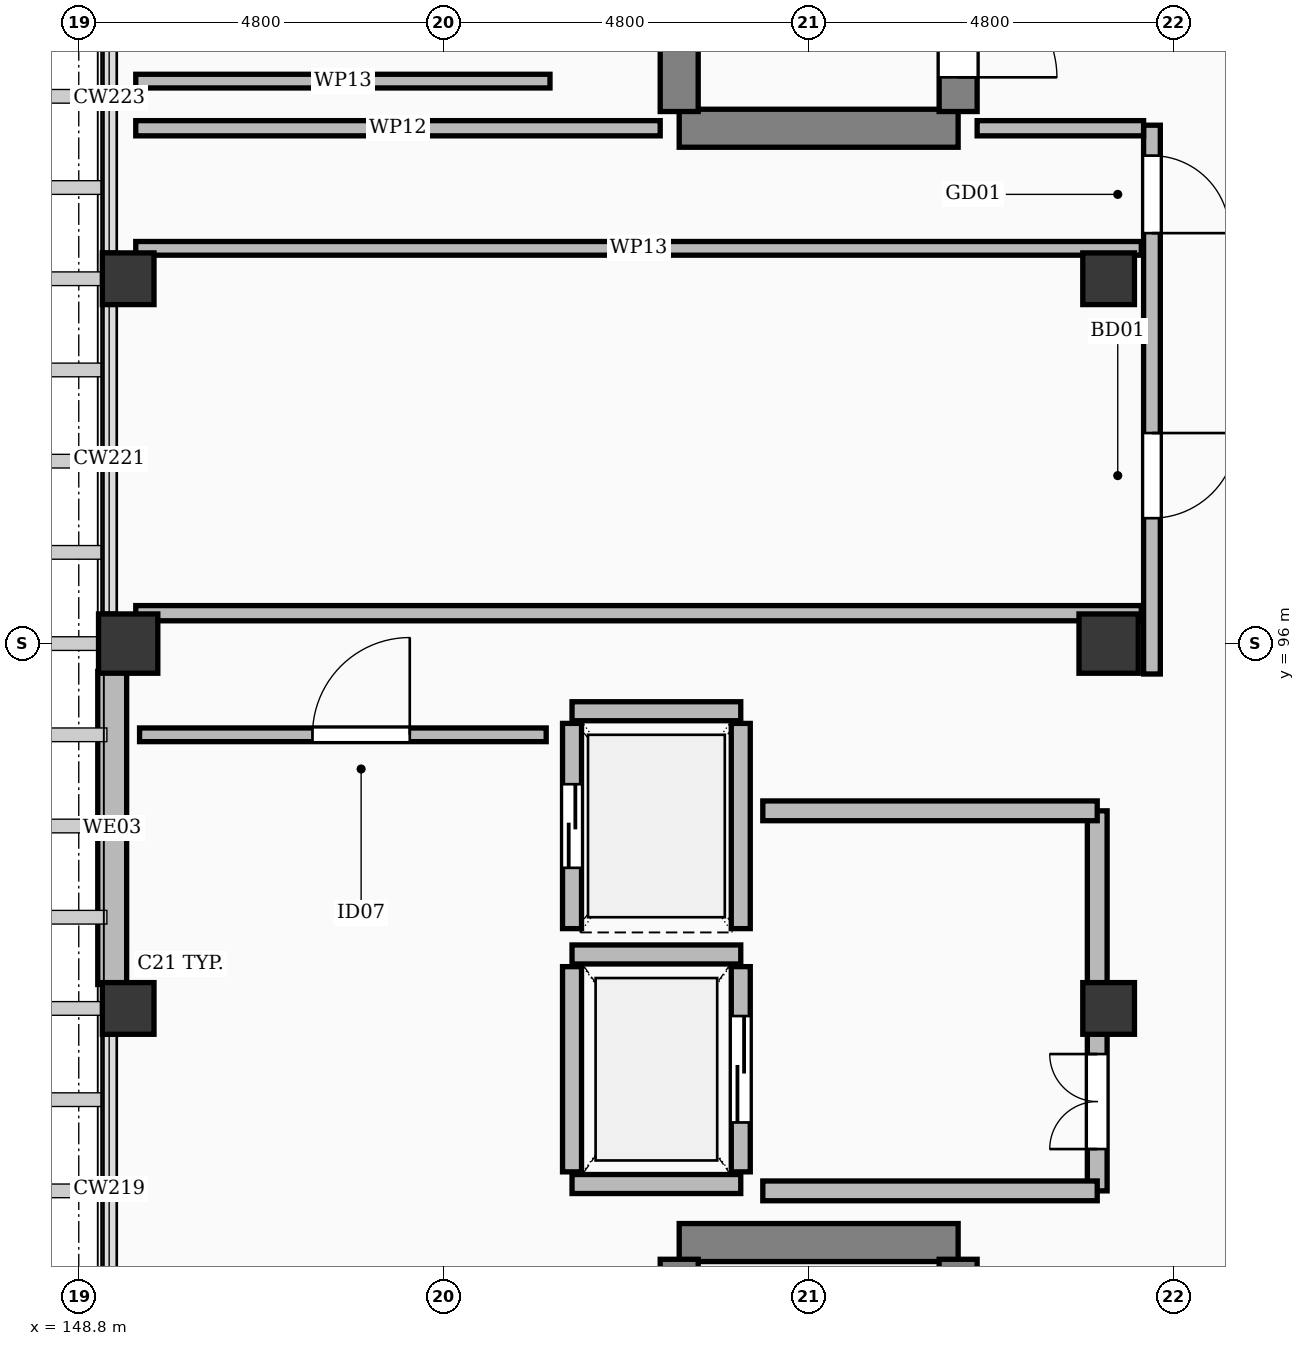
"""IFC4 building model, lengths in metres.
Left out: names, types, materials, properties, quantities, classifications, styles, units other than length and angle.
Written with IfcOpenShell. Run it as: python <this file> out.ifc"""

import sys

from ifc_helpers import new_model, si_unit, direction, frame, frame_2d, origin, origin_2d, place, context, subcontext, project, spatial, rectangle, extrude, element, fill, save


model = new_model("IFC4")
c1 = context("Model", 3, precision=1e-05, world=origin(), true_north=direction((0.0, 1.0)))
c2 = subcontext(c1, "Body", "Model", "MODEL_VIEW")
j1 = project(units=[si_unit("LENGTHUNIT", "METRE"), si_unit("PLANEANGLEUNIT", "RADIAN")], contexts=[c1])
p1 = place(None, origin())
s1 = spatial("IfcSite", under=j1, at=p1, CompositionType="ELEMENT")
p2 = place(p1, origin())
s2 = spatial("IfcBuilding", under=s1, at=p2, CompositionType="ELEMENT")
p3 = place(p2, frame((0.0, 0.0, 24.6)))
s3 = spatial("IfcBuildingStorey", under=s2, at=p3, CompositionType="ELEMENT", Elevation=24.6)
for number, where, z_axis, x_axis in (
    (1, (149.45, 96.0, 0.0), (0.0, 0.0, 1.0), (1.0, 0.0, 0.0)),
    (2, (162.35, 96.0, 0.0), (0.0, 0.0, 1.0), (1.0, 0.0, 0.0)),
):
    element("IfcColumn", number, at=place(p3, frame(where, z_axis=z_axis, x_axis=x_axis)), inside=s3, PredefinedType="COLUMN", context=c2, shape_type="SweptSolid", body=[
        extrude(rectangle(XDim=0.78, YDim=0.78, at=origin_2d()), origin(), (0.0, 0.0, 1.0), 3.6),
    ])
for number, where, z_axis, x_axis in (
    (3, (149.45, 91.2, 0.0), (0.0, 0.0, 1.0), (1.0, 0.0, 0.0)),
    (4, (149.45, 100.8, 0.0), (0.0, 0.0, 1.0), (1.0, 0.0, 0.0)),
    (5, (162.35, 91.2, 0.0), (0.0, 0.0, 1.0), (1.0, 0.0, 0.0)),
    (6, (162.35, 100.8, 0.0), (0.0, 0.0, 1.0), (1.0, 0.0, 0.0)),
):
    element("IfcColumn", number, at=place(p3, frame(where, z_axis=z_axis, x_axis=x_axis)), inside=s3, PredefinedType="COLUMN", context=c2, shape_type="SweptSolid", body=[
        extrude(rectangle(XDim=0.68, YDim=0.68, at=origin_2d()), origin(), (0.0, 0.0, 1.0), 3.6),
    ])
p4 = place(p3, frame((149.24, 91.515, 0.0), z_axis=(0.0, 0.0, 1.0), x_axis=(0.0, 1.0, 0.0)))
e7 = element("IfcWall", 7, at=p4, inside=s3, PredefinedType="SOLIDWALL", context=c2, shape_type="SweptSolid", body=[
    extrude(rectangle(XDim=4.12, YDim=0.38, at=frame_2d((2.06, 0.0))), origin(), (0.0, 0.0, 1.0), 2.632),
])
p5 = place(p3, frame((156.7, 88.12, 0.0), z_axis=(0.0, 0.0, 1.0), x_axis=(1.0, 0.0, 0.0)))
e8 = element("IfcWall", 8, at=p5, inside=s3, PredefinedType="SHEAR", context=c2, shape_type="SweptSolid", body=[
    extrude(rectangle(XDim=3.67, YDim=0.5, at=frame_2d((1.835, 0.0))), origin(), (0.0, 0.0, 1.0), 3.34),
])
p6 = place(p3, frame((156.7, 77.4, 0.0), z_axis=(0.0, 0.0, 1.0), x_axis=(0.0, 1.0, 0.0)))
e9 = element("IfcWall", 9, at=p6, inside=s3, PredefinedType="SHEAR", context=c2, shape_type="SweptSolid", body=[
    extrude(rectangle(XDim=10.5, YDim=0.5, at=frame_2d((5.25, 0.0))), origin(), (0.0, 0.0, 1.0), 3.34),
])
p7 = place(p3, frame((160.37, 77.4, 0.0), z_axis=(0.0, 0.0, 1.0), x_axis=(0.0, 1.0, 0.0)))
e10 = element("IfcWall", 10, at=p7, inside=s3, PredefinedType="SHEAR", context=c2, shape_type="SweptSolid", body=[
    extrude(rectangle(XDim=10.5, YDim=0.5, at=frame_2d((5.25, 0.0))), origin(), (0.0, 0.0, 1.0), 3.34),
])
p8 = place(p7, frame((0.45, 0.0, 0.0)))
e11 = element("IfcOpeningElement", 11, at=p8, cuts=e10, PredefinedType="OPENING", context=c2, shape_type="SweptSolid", body=[
    extrude(rectangle(XDim=1.3, YDim=2.15, at=frame_2d((0.65, 1.075))), frame((0.0, 0.262, 0.0), z_axis=(0.0, -1.0, 0.0), x_axis=(1.0, 0.0, 0.0)), (0.0, 0.0, 1.0), 0.524),
])
for number, where, z_axis, x_axis in (
    (12, (155.29, 88.89, 0.0), (0.0, 0.0, 1.0), (1.0, 0.0, 0.0)),
    (13, (155.29, 91.91, 0.0), (0.0, 0.0, 1.0), (1.0, 0.0, 0.0)),
):
    element("IfcWall", number, at=place(p3, frame(where, z_axis=z_axis, x_axis=x_axis)), inside=s3, PredefinedType="SOLIDWALL", context=c2, shape_type="SweptSolid", body=[
        extrude(rectangle(XDim=2.22, YDim=0.25, at=frame_2d((1.11, 0.0))), origin(), (0.0, 0.0, 1.0), 3.34),
    ])
p9 = place(p3, frame((155.29, 89.05, 0.0), z_axis=(0.0, 0.0, 1.0), x_axis=(0.0, 1.0, 0.0)))
e14 = element("IfcWall", 14, at=p9, inside=s3, PredefinedType="SOLIDWALL", context=c2, shape_type="SweptSolid", body=[
    extrude(rectangle(XDim=2.7, YDim=0.25, at=frame_2d((1.35, 0.0))), origin(), (0.0, 0.0, 1.0), 2.632),
])
p10 = place(p3, frame((157.51, 89.05, 0.0), z_axis=(0.0, 0.0, 1.0), x_axis=(0.0, 1.0, 0.0)))
e15 = element("IfcWall", 15, at=p10, inside=s3, PredefinedType="SOLIDWALL", context=c2, shape_type="SweptSolid", body=[
    extrude(rectangle(XDim=2.7, YDim=0.25, at=frame_2d((1.35, 0.0))), origin(), (0.0, 0.0, 1.0), 2.632),
])
p11 = place(p10, frame((0.65, 0.0, 0.0)))
e16 = element("IfcOpeningElement", 16, at=p11, cuts=e15, PredefinedType="OPENING", context=c2, shape_type="SweptSolid", body=[
    extrude(rectangle(XDim=1.4, YDim=2.3, at=frame_2d((0.7, 1.15))), frame((0.0, 0.137, 0.0), z_axis=(0.0, -1.0, 0.0), x_axis=(1.0, 0.0, 0.0)), (0.0, 0.0, 1.0), 0.274),
])
p12 = place(p3, frame((155.29, 95.11, 0.0), z_axis=(0.0, 0.0, 1.0), x_axis=(1.0, 0.0, 0.0)))
e17 = element("IfcWall", 17, at=p12, inside=s3, PredefinedType="SOLIDWALL", context=c2, shape_type="SweptSolid", body=[
    extrude(rectangle(XDim=2.22, YDim=0.25, at=frame_2d((1.11, 0.0))), origin(), (0.0, 0.0, 1.0), 3.34),
])
p13 = place(p3, frame((155.29, 92.25, 0.0), z_axis=(0.0, 0.0, 1.0), x_axis=(0.0, 1.0, 0.0)))
e18 = element("IfcWall", 18, at=p13, inside=s3, PredefinedType="SOLIDWALL", context=c2, shape_type="SweptSolid", body=[
    extrude(rectangle(XDim=2.7, YDim=0.25, at=frame_2d((1.35, 0.0))), origin(), (0.0, 0.0, 1.0), 3.34),
])
p14 = place(p13, frame((0.8, 0.0, 0.0)))
e19 = element("IfcOpeningElement", 19, at=p14, cuts=e18, PredefinedType="OPENING", context=c2, shape_type="SweptSolid", body=[
    extrude(rectangle(XDim=1.1, YDim=2.2, at=frame_2d((0.55, 1.1))), frame((0.0, 0.137, 0.0), z_axis=(0.0, -1.0, 0.0), x_axis=(1.0, 0.0, 0.0)), (0.0, 0.0, 1.0), 0.274),
])
p15 = place(p3, frame((157.51, 92.25, 0.0), z_axis=(0.0, 0.0, 1.0), x_axis=(0.0, 1.0, 0.0)))
e20 = element("IfcWall", 20, at=p15, inside=s3, PredefinedType="SOLIDWALL", context=c2, shape_type="SweptSolid", body=[
    extrude(rectangle(XDim=2.7, YDim=0.25, at=frame_2d((1.35, 0.0))), origin(), (0.0, 0.0, 1.0), 3.34),
])
p16 = place(p3, frame((162.2, 88.8, 0.0), z_axis=(0.0, 0.0, 1.0), x_axis=(0.0, 1.0, 0.0)))
e21 = element("IfcWall", 21, at=p16, inside=s3, PredefinedType="SOLIDWALL", context=c2, shape_type="SweptSolid", body=[
    extrude(rectangle(XDim=5.0, YDim=0.26, at=frame_2d((2.5, 0.0))), origin(), (0.0, 0.0, 1.0), 2.632),
])
p17 = place(p16, frame((0.55, 0.0, 0.0)))
e22 = element("IfcOpeningElement", 22, at=p17, cuts=e21, PredefinedType="OPENING", context=c2, shape_type="SweptSolid", body=[
    extrude(rectangle(XDim=1.25, YDim=2.15, at=frame_2d((0.625, 1.075))), frame((0.0, 0.142, 0.0), z_axis=(0.0, -1.0, 0.0), x_axis=(1.0, 0.0, 0.0)), (0.0, 0.0, 1.0), 0.284),
])
for number, where, z_axis, x_axis in (
    (23, (157.8, 88.8, 0.0), (0.0, 0.0, 1.0), (1.0, 0.0, 0.0)),
    (24, (157.8, 93.8, 0.0), (0.0, 0.0, 1.0), (1.0, 0.0, 0.0)),
):
    element("IfcWall", number, at=place(p3, frame(where, z_axis=z_axis, x_axis=x_axis)), inside=s3, PredefinedType="SOLIDWALL", context=c2, shape_type="SweptSolid", body=[
        extrude(rectangle(XDim=4.4, YDim=0.26, at=frame_2d((2.2, 0.0))), origin(), (0.0, 0.0, 1.0), 2.632),
    ])
p18 = place(p3, frame((156.7, 102.78, 0.0), z_axis=(0.0, 0.0, 1.0), x_axis=(1.0, 0.0, 0.0)))
e25 = element("IfcWall", 25, at=p18, inside=s3, PredefinedType="SHEAR", context=c2, shape_type="SweptSolid", body=[
    extrude(rectangle(XDim=3.67, YDim=0.5, at=frame_2d((1.835, 0.0))), origin(), (0.0, 0.0, 1.0), 3.34),
])
p19 = place(p3, frame((156.7, 103.0, 0.0), z_axis=(0.0, 0.0, 1.0), x_axis=(0.0, 1.0, 0.0)))
e26 = element("IfcWall", 26, at=p19, inside=s3, PredefinedType="SHEAR", context=c2, shape_type="SweptSolid", body=[
    extrude(rectangle(XDim=10.5, YDim=0.5, at=frame_2d((5.25, 0.0))), origin(), (0.0, 0.0, 1.0), 3.34),
])
p20 = place(p3, frame((160.37, 103.0, 0.0), z_axis=(0.0, 0.0, 1.0), x_axis=(0.0, 1.0, 0.0)))
e27 = element("IfcWall", 27, at=p20, inside=s3, PredefinedType="SHEAR", context=c2, shape_type="SweptSolid", body=[
    extrude(rectangle(XDim=10.5, YDim=0.5, at=frame_2d((5.25, 0.0))), origin(), (0.0, 0.0, 1.0), 3.34),
])
p21 = place(p20, frame((0.45, 0.0, 0.0)))
e28 = element("IfcOpeningElement", 28, at=p21, cuts=e27, PredefinedType="OPENING", context=c2, shape_type="SweptSolid", body=[
    extrude(rectangle(XDim=1.3, YDim=2.15, at=frame_2d((0.65, 1.075))), frame((0.0, 0.262, 0.0), z_axis=(0.0, -1.0, 0.0), x_axis=(1.0, 0.0, 0.0)), (0.0, 0.0, 1.0), 0.524),
])
p22 = place(p3, frame((162.92, 95.6, 0.0), z_axis=(0.0, 0.0, 1.0), x_axis=(0.0, 1.0, 0.0)))
e29 = element("IfcWall", 29, at=p22, inside=s3, PredefinedType="PARTITIONING", context=c2, shape_type="SweptSolid", body=[
    extrude(rectangle(XDim=7.22, YDim=0.22, at=frame_2d((3.61, 0.0))), origin(), (0.0, 0.0, 1.0), 2.632),
])
p23 = place(p22, frame((2.05, 0.0, 0.0)))
e30 = element("IfcOpeningElement", 30, at=p23, cuts=e29, PredefinedType="OPENING", context=c2, shape_type="SweptSolid", body=[
    extrude(rectangle(XDim=1.12, YDim=2.15, at=frame_2d((0.56, 1.075))), frame((0.0, 0.122, 0.0), z_axis=(0.0, -1.0, 0.0), x_axis=(1.0, 0.0, 0.0)), (0.0, 0.0, 1.0), 0.244),
])
p24 = place(p22, frame((5.8, 0.0, 0.0)))
e31 = element("IfcOpeningElement", 31, at=p24, cuts=e29, PredefinedType="OPENING", context=c2, shape_type="SweptSolid", body=[
    extrude(rectangle(XDim=1.02, YDim=2.2, at=frame_2d((0.51, 1.1))), frame((0.0, 0.122, 0.0), z_axis=(0.0, -1.0, 0.0), x_axis=(1.0, 0.0, 0.0)), (0.0, 0.0, 1.0), 0.244),
])
p25 = place(p3, frame((149.55, 96.4, 0.0), z_axis=(0.0, 0.0, 1.0), x_axis=(1.0, 0.0, 0.0)))
e32 = element("IfcWall", 32, at=p25, inside=s3, PredefinedType="PARTITIONING", context=c2, shape_type="SweptSolid", body=[
    extrude(rectangle(XDim=13.23, YDim=0.2, at=frame_2d((6.615, 0.0))), origin(), (0.0, 0.0, 1.0), 2.632),
])
p26 = place(p3, frame((149.55, 101.2, 0.0), z_axis=(0.0, 0.0, 1.0), x_axis=(1.0, 0.0, 0.0)))
e33 = element("IfcWall", 33, at=p26, inside=s3, PredefinedType="PARTITIONING", context=c2, shape_type="SweptSolid", body=[
    extrude(rectangle(XDim=13.23, YDim=0.18, at=frame_2d((6.615, 0.0))), origin(), (0.0, 0.0, 1.0), 2.632),
])
p27 = place(p3, frame((149.55, 102.78, 0.0), z_axis=(0.0, 0.0, 1.0), x_axis=(1.0, 0.0, 0.0)))
e34 = element("IfcWall", 34, at=p27, inside=s3, PredefinedType="PARTITIONING", context=c2, shape_type="SweptSolid", body=[
    extrude(rectangle(XDim=6.9, YDim=0.2, at=frame_2d((3.45, 0.0))), origin(), (0.0, 0.0, 1.0), 2.632),
])
p28 = place(p3, frame((160.62, 102.78, 0.0), z_axis=(0.0, 0.0, 1.0), x_axis=(1.0, 0.0, 0.0)))
e35 = element("IfcWall", 35, at=p28, inside=s3, PredefinedType="PARTITIONING", context=c2, shape_type="SweptSolid", body=[
    extrude(rectangle(XDim=2.19, YDim=0.2, at=frame_2d((1.095, 0.0))), origin(), (0.0, 0.0, 1.0), 2.632),
])
p29 = place(p3, frame((149.6, 94.8, 0.0), z_axis=(0.0, 0.0, 1.0), x_axis=(1.0, 0.0, 0.0)))
e36 = element("IfcWall", 36, at=p29, inside=s3, PredefinedType="PARTITIONING", context=c2, shape_type="SweptSolid", body=[
    extrude(rectangle(XDim=5.35, YDim=0.18, at=frame_2d((2.675, 0.0))), origin(), (0.0, 0.0, 1.0), 2.632),
])
p30 = place(p29, frame((2.275, 0.0, 0.0)))
e37 = element("IfcOpeningElement", 37, at=p30, cuts=e36, PredefinedType="OPENING", context=c2, shape_type="SweptSolid", body=[
    extrude(rectangle(XDim=1.28, YDim=2.16, at=frame_2d((0.64, 1.08))), frame((0.0, 0.102, 0.0), z_axis=(0.0, -1.0, 0.0), x_axis=(1.0, 0.0, 0.0)), (0.0, 0.0, 1.0), 0.204),
])
p31 = place(p3, frame((149.55, 103.4, 0.0), z_axis=(0.0, 0.0, 1.0), x_axis=(1.0, 0.0, 0.0)))
e38 = element("IfcWall", 38, at=p31, inside=s3, PredefinedType="PARTITIONING", context=c2, shape_type="SweptSolid", body=[
    extrude(rectangle(XDim=5.45, YDim=0.18, at=frame_2d((2.725, 0.0))), origin(), (0.0, 0.0, 1.0), 2.632),
])
p32 = place(p11, origin())
e39 = element("IfcDoor", 39, at=p32, inside=s3, OperationType="SLIDING_TO_LEFT", PredefinedType="DOOR", context=c2, shape_type="SweptSolid", body=[
    extrude(rectangle(XDim=1.4, YDim=2.3, at=frame_2d((0.7, 1.15))), frame((0.0, 0.025, 0.0), z_axis=(0.0, -1.0, 0.0), x_axis=(1.0, 0.0, 0.0)), (0.0, 0.0, 1.0), 0.05),
])
fill(e16, e39)
p33 = place(p14, origin())
e40 = element("IfcDoor", 40, at=p33, inside=s3, OperationType="SLIDING_TO_LEFT", PredefinedType="DOOR", context=c2, shape_type="SweptSolid", body=[
    extrude(rectangle(XDim=1.1, YDim=2.2, at=frame_2d((0.55, 1.1))), frame((0.0, 0.025, 0.0), z_axis=(0.0, -1.0, 0.0), x_axis=(1.0, 0.0, 0.0)), (0.0, 0.0, 1.0), 0.05),
])
fill(e19, e40)
p34 = place(p17, origin())
e41 = element("IfcDoor", 41, at=p34, inside=s3, OperationType="DOUBLE_DOOR_SINGLE_SWING", PredefinedType="DOOR", context=c2, shape_type="SweptSolid", body=[
    extrude(rectangle(XDim=1.25, YDim=2.15, at=frame_2d((0.625, 1.075))), frame((0.0, 0.025, 0.0), z_axis=(0.0, -1.0, 0.0), x_axis=(1.0, 0.0, 0.0)), (0.0, 0.0, 1.0), 0.05),
])
fill(e22, e41)
p35 = place(p21, frame((1.3, 0.0, 0.0), z_axis=(0.0, 0.0, 1.0), x_axis=(-1.0, 0.0, 0.0)))
e42 = element("IfcDoor", 42, at=p35, inside=s3, OperationType="SINGLE_SWING_LEFT", PredefinedType="DOOR", context=c2, shape_type="SweptSolid", body=[
    extrude(rectangle(XDim=1.3, YDim=2.15, at=frame_2d((0.65, 1.075))), frame((0.0, 0.025, 0.0), z_axis=(0.0, -1.0, 0.0), x_axis=(1.0, 0.0, 0.0)), (0.0, 0.0, 1.0), 0.05),
])
fill(e28, e42)
p36 = place(p23, frame((1.12, 0.0, 0.0), z_axis=(0.0, 0.0, 1.0), x_axis=(-1.0, 0.0, 0.0)))
e43 = element("IfcDoor", 43, at=p36, inside=s3, OperationType="SINGLE_SWING_RIGHT", PredefinedType="DOOR", context=c2, shape_type="SweptSolid", body=[
    extrude(rectangle(XDim=1.12, YDim=2.15, at=frame_2d((0.56, 1.075))), frame((0.0, 0.025, 0.0), z_axis=(0.0, -1.0, 0.0), x_axis=(1.0, 0.0, 0.0)), (0.0, 0.0, 1.0), 0.05),
])
fill(e30, e43)
p37 = place(p24, frame((1.02, 0.0, 0.0), z_axis=(0.0, 0.0, 1.0), x_axis=(-1.0, 0.0, 0.0)))
e44 = element("IfcDoor", 44, at=p37, inside=s3, OperationType="SINGLE_SWING_LEFT", PredefinedType="DOOR", context=c2, shape_type="SweptSolid", body=[
    extrude(rectangle(XDim=1.02, YDim=2.2, at=frame_2d((0.51, 1.1))), frame((0.0, 0.025, 0.0), z_axis=(0.0, -1.0, 0.0), x_axis=(1.0, 0.0, 0.0)), (0.0, 0.0, 1.0), 0.05),
])
fill(e31, e44)
p38 = place(p30, origin())
e45 = element("IfcDoor", 45, at=p38, inside=s3, OperationType="SINGLE_SWING_RIGHT", PredefinedType="DOOR", context=c2, shape_type="SweptSolid", body=[
    extrude(rectangle(XDim=1.28, YDim=2.16, at=frame_2d((0.64, 1.08))), frame((0.0, 0.025, 0.0), z_axis=(0.0, -1.0, 0.0), x_axis=(1.0, 0.0, 0.0)), (0.0, 0.0, 1.0), 0.05),
])
fill(e37, e45)
save(model, sys.argv[1])
